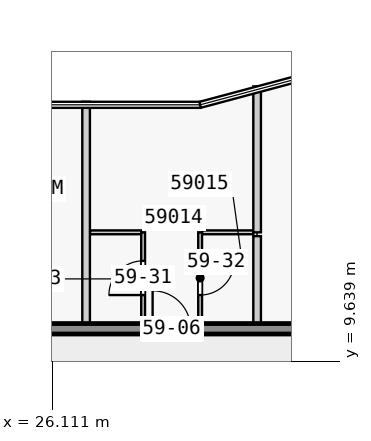
"""IFC4 building model, lengths in metres.
Left out: names, types, materials, properties, quantities, classifications, styles, units other than length and angle.
Written with IfcOpenShell. Run it as: python <this file> out.ifc"""

import sys

from ifc_helpers import new_model, si_unit, direction, frame, frame_2d, origin, place, context, subcontext, project, spatial, rectangle, extrude, element, fill, save


model = new_model("IFC4")
c1 = context("Model", 3, precision=1e-05, world=origin(), true_north=direction((0.0, 1.0)))
c2 = subcontext(c1, "Body", "Model", "MODEL_VIEW")
j1 = project(units=[si_unit("LENGTHUNIT", "METRE"), si_unit("PLANEANGLEUNIT", "RADIAN")], contexts=[c1])
p1 = place(None, origin())
s1 = spatial("IfcSite", under=j1, at=p1, CompositionType="ELEMENT")
p2 = place(p1, origin())
s2 = spatial("IfcBuilding", under=s1, at=p2, CompositionType="ELEMENT")
p3 = place(p2, frame((0.0, 0.0, 225.9)))
s3 = spatial("IfcBuildingStorey", under=s2, at=p3, CompositionType="ELEMENT", Elevation=225.9)
p4 = place(p3, frame((22.5, 10.5, 0.0), z_axis=(0.0, 0.0, 1.0), x_axis=(1.0, 0.0, 0.0)))
e1 = element("IfcWall", 1, at=p4, inside=s3, PredefinedType="SHEAR", context=c2, shape_type="SweptSolid", body=[
    extrude(rectangle(XDim=22.5, YDim=0.275, at=frame_2d((11.25, 0.0))), origin(), (0.0, 0.0, 1.0), 3.05),
])
p5 = place(p4, frame((1.75, 0.0, 0.0)))
e2 = element("IfcOpeningElement", 2, at=p5, cuts=e1, PredefinedType="OPENING", context=c2, shape_type="SweptSolid", body=[
    extrude(rectangle(XDim=1.0, YDim=2.1, at=frame_2d((0.5, 1.05))), frame((0.0, 0.147, 0.0), z_axis=(0.0, -1.0, 0.0), x_axis=(1.0, 0.0, 0.0)), (0.0, 0.0, 1.0), 0.295),
])
p6 = place(p4, frame((6.25, 0.0, 0.0)))
e3 = element("IfcOpeningElement", 3, at=p6, cuts=e1, PredefinedType="OPENING", context=c2, shape_type="SweptSolid", body=[
    extrude(rectangle(XDim=1.0, YDim=2.1, at=frame_2d((0.5, 1.05))), frame((0.0, 0.147, 0.0), z_axis=(0.0, -1.0, 0.0), x_axis=(1.0, 0.0, 0.0)), (0.0, 0.0, 1.0), 0.295),
])
p7 = place(p4, frame((10.35, 0.0, 0.0)))
e4 = element("IfcOpeningElement", 4, at=p7, cuts=e1, PredefinedType="OPENING", context=c2, shape_type="SweptSolid", body=[
    extrude(rectangle(XDim=1.8, YDim=2.1, at=frame_2d((0.9, 1.05))), frame((0.0, 0.147, 0.0), z_axis=(0.0, -1.0, 0.0), x_axis=(1.0, 0.0, 0.0)), (0.0, 0.0, 1.0), 0.295),
])
p8 = place(p4, frame((15.25, 0.0, 0.0)))
e5 = element("IfcOpeningElement", 5, at=p8, cuts=e1, PredefinedType="OPENING", context=c2, shape_type="SweptSolid", body=[
    extrude(rectangle(XDim=1.0, YDim=2.1, at=frame_2d((0.5, 1.05))), frame((0.0, 0.147, 0.0), z_axis=(0.0, -1.0, 0.0), x_axis=(1.0, 0.0, 0.0)), (0.0, 0.0, 1.0), 0.295),
])
p9 = place(p4, frame((18.75, 0.0, 0.0)))
e6 = element("IfcOpeningElement", 6, at=p9, cuts=e1, PredefinedType="OPENING", context=c2, shape_type="SweptSolid", body=[
    extrude(rectangle(XDim=0.9, YDim=2.1, at=frame_2d((0.45, 1.05))), frame((0.0, 0.147, 0.0), z_axis=(0.0, -1.0, 0.0), x_axis=(1.0, 0.0, 0.0)), (0.0, 0.0, 1.0), 0.295),
])
p10 = place(p4, frame((20.95, 0.0, 0.0)))
e7 = element("IfcOpeningElement", 7, at=p10, cuts=e1, PredefinedType="OPENING", context=c2, shape_type="SweptSolid", body=[
    extrude(rectangle(XDim=1.0, YDim=2.1, at=frame_2d((0.5, 1.05))), frame((0.0, 0.147, 0.0), z_axis=(0.0, -1.0, 0.0), x_axis=(1.0, 0.0, 0.0)), (0.0, 0.0, 1.0), 0.295),
])
for number, where, z_axis, x_axis in (
    (8, (28.45, 13.038, 0.0), (0.0, 0.0, 1.0), (-1.0, 0.0, 0.0)),
    (9, (31.4, 13.038, 0.0), (0.0, 0.0, 1.0), (-1.0, 0.0, 0.0)),
):
    element("IfcWall", number, at=place(p3, frame(where, z_axis=z_axis, x_axis=x_axis)), inside=s3, PredefinedType="PARTITIONING", context=c2, shape_type="SweptSolid", body=[
        extrude(rectangle(XDim=1.35, YDim=0.1, at=frame_2d((0.675, 0.0))), origin(), (0.0, 0.0, 1.0), 3.05),
    ])
p11 = place(p3, frame((27.0, 10.637, 0.0), z_axis=(0.0, 0.0, 1.0), x_axis=(0.0, 1.0, 0.0)))
e10 = element("IfcWall", 10, at=p11, inside=s3, PredefinedType="PARTITIONING", context=c2, shape_type="SweptSolid", body=[
    extrude(rectangle(XDim=5.836, YDim=0.2, at=frame_2d((2.918, 0.0))), origin(), (0.0, 0.0, 1.0), 3.05),
])
p12 = place(p3, frame((28.5, 10.637, 0.0), z_axis=(0.0, 0.0, 1.0), x_axis=(0.0, 1.0, 0.0)))
e11 = element("IfcWall", 11, at=p12, inside=s3, PredefinedType="PARTITIONING", context=c2, shape_type="SweptSolid", body=[
    extrude(rectangle(XDim=2.4, YDim=0.1, at=frame_2d((1.2, 0.0))), origin(), (0.0, 0.0, 1.0), 3.05),
])
p13 = place(p12, frame((0.75, 0.0, 0.0)))
e12 = element("IfcOpeningElement", 12, at=p13, cuts=e11, PredefinedType="OPENING", context=c2, shape_type="SweptSolid", body=[
    extrude(rectangle(XDim=0.9, YDim=2.1, at=frame_2d((0.45, 1.05))), frame((0.0, 0.06, 0.0), z_axis=(0.0, -1.0, 0.0), x_axis=(1.0, 0.0, 0.0)), (0.0, 0.0, 1.0), 0.12),
])
p14 = place(p3, frame((30.0, 13.038, 0.0), z_axis=(0.0, 0.0, 1.0), x_axis=(0.0, -1.0, 0.0)))
e13 = element("IfcWall", 13, at=p14, inside=s3, PredefinedType="PARTITIONING", context=c2, shape_type="SweptSolid", body=[
    extrude(rectangle(XDim=2.4, YDim=0.1, at=frame_2d((1.2, 0.0))), origin(), (0.0, 0.0, 1.0), 3.05),
])
p15 = place(p14, frame((0.75, 0.0, 0.0)))
e14 = element("IfcOpeningElement", 14, at=p15, cuts=e13, PredefinedType="OPENING", context=c2, shape_type="SweptSolid", body=[
    extrude(rectangle(XDim=0.9, YDim=2.1, at=frame_2d((0.45, 1.05))), frame((0.0, 0.06, 0.0), z_axis=(0.0, -1.0, 0.0), x_axis=(1.0, 0.0, 0.0)), (0.0, 0.0, 1.0), 0.12),
])
p16 = place(p3, frame((31.5, 16.878, 0.0), z_axis=(0.0, 0.0, 1.0), x_axis=(0.0, -1.0, 0.0)))
e15 = element("IfcWall", 15, at=p16, inside=s3, PredefinedType="PARTITIONING", context=c2, shape_type="SweptSolid", body=[
    extrude(rectangle(XDim=3.84, YDim=0.2, at=frame_2d((1.92, 0.0))), origin(), (0.0, 0.0, 1.0), 3.05),
])
p17 = place(p3, frame((31.5, 10.637, 0.0), z_axis=(0.0, 0.0, 1.0), x_axis=(0.0, 1.0, 0.0)))
e16 = element("IfcWall", 16, at=p17, inside=s3, PredefinedType="PARTITIONING", context=c2, shape_type="SweptSolid", body=[
    extrude(rectangle(XDim=2.3, YDim=0.2, at=frame_2d((1.15, 0.0))), origin(), (0.0, 0.0, 1.0), 3.05),
])
p18 = place(p6, origin())
e17 = element("IfcDoor", 17, at=p18, inside=s3, OperationType="SINGLE_SWING_LEFT", PredefinedType="DOOR", context=c2, shape_type="SweptSolid", body=[
    extrude(rectangle(XDim=1.0, YDim=2.1, at=frame_2d((0.5, 1.05))), frame((0.0, 0.025, 0.0), z_axis=(0.0, -1.0, 0.0), x_axis=(1.0, 0.0, 0.0)), (0.0, 0.0, 1.0), 0.05),
])
fill(e3, e17)
p19 = place(p13, origin())
e18 = element("IfcDoor", 18, at=p19, inside=s3, OperationType="SINGLE_SWING_LEFT", PredefinedType="DOOR", context=c2, shape_type="SweptSolid", body=[
    extrude(rectangle(XDim=0.9, YDim=2.1, at=frame_2d((0.45, 1.05))), frame((0.0, 0.025, 0.0), z_axis=(0.0, -1.0, 0.0), x_axis=(1.0, 0.0, 0.0)), (0.0, 0.0, 1.0), 0.05),
])
fill(e12, e18)
p20 = place(p15, origin())
e19 = element("IfcDoor", 19, at=p20, inside=s3, OperationType="SINGLE_SWING_LEFT", PredefinedType="DOOR", context=c2, shape_type="SweptSolid", body=[
    extrude(rectangle(XDim=0.9, YDim=2.1, at=frame_2d((0.45, 1.05))), frame((0.0, 0.025, 0.0), z_axis=(0.0, -1.0, 0.0), x_axis=(1.0, 0.0, 0.0)), (0.0, 0.0, 1.0), 0.05),
])
fill(e14, e19)
save(model, sys.argv[1])
